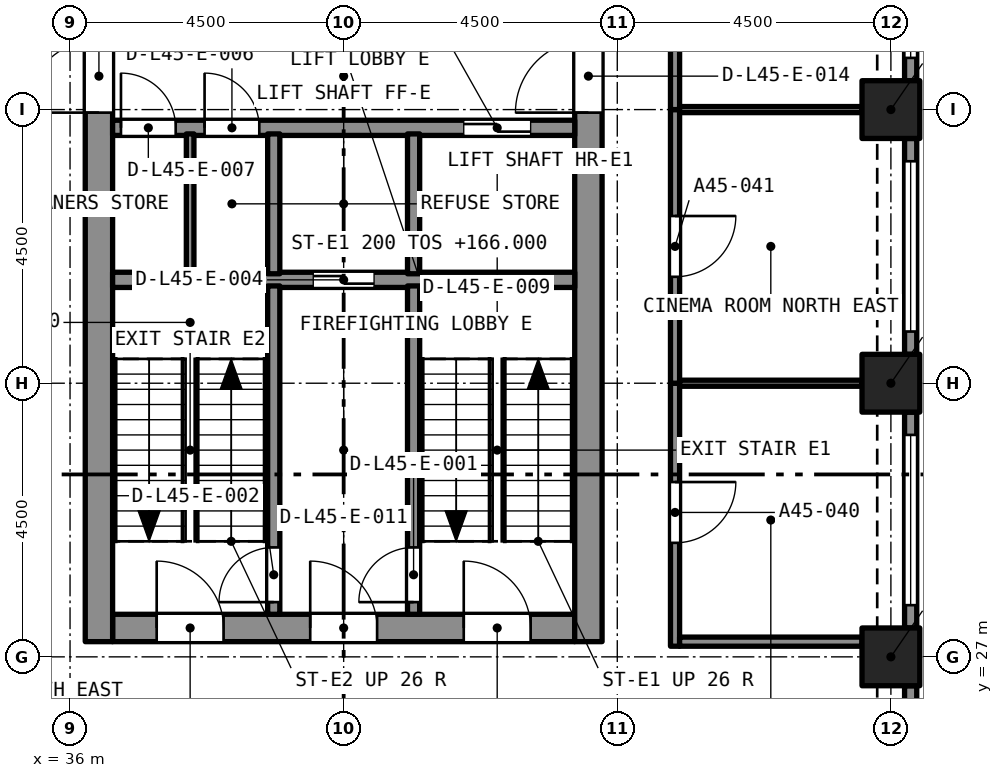
"""IFC4 building model, lengths in metres.
Left out: names, types, materials, properties, quantities, classifications, styles, units other than length and angle.
Written with IfcOpenShell. Run it as: python <this file> out.ifc"""

import sys

from ifc_helpers import new_model, si_unit, direction, frame, frame_2d, origin, origin_2d, place, context, subcontext, project, spatial, rectangle, extrude, element, fill, save


model = new_model("IFC4")
c1 = context("Model", 3, precision=1e-05, world=origin(), true_north=direction((0.0, 1.0)))
c2 = subcontext(c1, "Body", "Model", "MODEL_VIEW")
j1 = project(units=[si_unit("LENGTHUNIT", "METRE"), si_unit("PLANEANGLEUNIT", "RADIAN")], contexts=[c1])
p1 = place(None, origin())
s1 = spatial("IfcSite", under=j1, at=p1, CompositionType="ELEMENT")
p2 = place(p1, origin())
s2 = spatial("IfcBuilding", under=s1, at=p2, CompositionType="ELEMENT")
p3 = place(p2, frame((0.0, 0.0, 163.8)))
s3 = spatial("IfcBuildingStorey", under=s2, at=p3, CompositionType="ELEMENT", Elevation=163.8)
for number, where, z_axis, x_axis in (
    (1, (49.5, 27.0, 0.0), (0.0, 0.0, 1.0), (1.0, 0.0, 0.0)),
    (2, (49.5, 31.5, 0.0), (0.0, 0.0, 1.0), (1.0, 0.0, 0.0)),
    (3, (49.5, 36.0, 0.0), (0.0, 0.0, 1.0), (1.0, 0.0, 0.0)),
):
    element("IfcColumn", number, at=place(p3, frame(where, z_axis=z_axis, x_axis=x_axis)), inside=s3, PredefinedType="COLUMN", context=c2, shape_type="SweptSolid", body=[
        extrude(rectangle(XDim=0.95, YDim=0.95, at=origin_2d()), origin(), (0.0, 0.0, 1.0), 4.4),
    ])
p4 = place(p3, frame((36.7, 27.475, 0.0), z_axis=(0.0, 0.0, 1.0), x_axis=(1.0, 0.0, 0.0)))
e4 = element("IfcWall", 4, at=p4, inside=s3, PredefinedType="SOLIDWALL", context=c2, shape_type="SweptSolid", body=[
    extrude(rectangle(XDim=7.6, YDim=0.45, at=frame_2d((3.8, 0.0))), origin(), (0.0, 0.0, 1.0), 4.4),
])
p5 = place(p4, frame((5.775, 0.0, 0.0)))
e5 = element("IfcOpeningElement", 5, at=p5, cuts=e4, PredefinedType="OPENING", context=c2, shape_type="SweptSolid", body=[
    extrude(rectangle(XDim=1.1, YDim=2.1, at=frame_2d((0.55, 1.05))), frame((0.0, 0.235, 0.0), z_axis=(0.0, -1.0, 0.0), x_axis=(1.0, 0.0, 0.0)), (0.0, 0.0, 1.0), 0.47),
])
p6 = place(p4, frame((3.25, 0.0, 0.0)))
e6 = element("IfcOpeningElement", 6, at=p6, cuts=e4, PredefinedType="OPENING", context=c2, shape_type="SweptSolid", body=[
    extrude(rectangle(XDim=1.1, YDim=2.1, at=frame_2d((0.55, 1.05))), frame((0.0, 0.235, 0.0), z_axis=(0.0, -1.0, 0.0), x_axis=(1.0, 0.0, 0.0)), (0.0, 0.0, 1.0), 0.47),
])
p7 = place(p4, frame((0.725, 0.0, 0.0)))
e7 = element("IfcOpeningElement", 7, at=p7, cuts=e4, PredefinedType="OPENING", context=c2, shape_type="SweptSolid", body=[
    extrude(rectangle(XDim=1.1, YDim=2.1, at=frame_2d((0.55, 1.05))), frame((0.0, 0.235, 0.0), z_axis=(0.0, -1.0, 0.0), x_axis=(1.0, 0.0, 0.0)), (0.0, 0.0, 1.0), 0.47),
])
p8 = place(p3, frame((36.475, 27.25, 0.0), z_axis=(0.0, 0.0, 1.0), x_axis=(0.0, 1.0, 0.0)))
e8 = element("IfcWall", 8, at=p8, inside=s3, PredefinedType="SOLIDWALL", context=c2, shape_type="SweptSolid", body=[
    extrude(rectangle(XDim=13.0, YDim=0.45, at=frame_2d((6.5, 0.0))), origin(), (0.0, 0.0, 1.0), 4.4),
])
p9 = place(p8, frame((8.7, 0.0, 0.0)))
e9 = element("IfcOpeningElement", 9, at=p9, cuts=e8, PredefinedType="OPENING", context=c2, shape_type="SweptSolid", body=[
    extrude(rectangle(XDim=1.2, YDim=2.1, at=frame_2d((0.6, 1.05))), frame((0.0, 0.235, 0.0), z_axis=(0.0, -1.0, 0.0), x_axis=(1.0, 0.0, 0.0)), (0.0, 0.0, 1.0), 0.47),
])
p10 = place(p3, frame((44.525, 27.25, 0.0), z_axis=(0.0, 0.0, 1.0), x_axis=(0.0, 1.0, 0.0)))
e10 = element("IfcWall", 10, at=p10, inside=s3, PredefinedType="SOLIDWALL", context=c2, shape_type="SweptSolid", body=[
    extrude(rectangle(XDim=13.0, YDim=0.45, at=frame_2d((6.5, 0.0))), origin(), (0.0, 0.0, 1.0), 4.4),
])
p11 = place(p10, frame((8.7, 0.0, 0.0)))
e11 = element("IfcOpeningElement", 11, at=p11, cuts=e10, PredefinedType="OPENING", context=c2, shape_type="SweptSolid", body=[
    extrude(rectangle(XDim=1.2, YDim=2.1, at=frame_2d((0.6, 1.05))), frame((0.0, 0.235, 0.0), z_axis=(0.0, -1.0, 0.0), x_axis=(1.0, 0.0, 0.0)), (0.0, 0.0, 1.0), 0.47),
])
p12 = place(p3, frame((49.825, 26.525, 0.0), z_axis=(0.0, 0.0, 1.0), x_axis=(0.0, -1.0, 0.0)))
e12 = element("IfcWall", 12, at=p12, inside=s3, PredefinedType="SOLIDWALL", context=c2, shape_type="SweptSolid", body=[
    extrude(rectangle(XDim=3.55, YDim=0.2, at=frame_2d((1.775, 0.0))), origin(), (0.0, 0.0, 1.0), 4.4),
])
p13 = place(p12, frame((0.375, 0.0, 0.45)))
e13 = element("IfcOpeningElement", 13, at=p13, cuts=e12, PredefinedType="OPENING", context=c2, shape_type="SweptSolid", body=[
    extrude(rectangle(XDim=2.8, YDim=2.55, at=frame_2d((1.4, 1.275))), frame((0.0, 0.11, 0.0), z_axis=(0.0, -1.0, 0.0), x_axis=(1.0, 0.0, 0.0)), (0.0, 0.0, 1.0), 0.22),
])
p14 = place(p3, frame((49.825, 31.025, 0.0), z_axis=(0.0, 0.0, 1.0), x_axis=(0.0, -1.0, 0.0)))
e14 = element("IfcWall", 14, at=p14, inside=s3, PredefinedType="SOLIDWALL", context=c2, shape_type="SweptSolid", body=[
    extrude(rectangle(XDim=3.55, YDim=0.2, at=frame_2d((1.775, 0.0))), origin(), (0.0, 0.0, 1.0), 4.4),
])
p15 = place(p14, frame((0.375, 0.0, 0.45)))
e15 = element("IfcOpeningElement", 15, at=p15, cuts=e14, PredefinedType="OPENING", context=c2, shape_type="SweptSolid", body=[
    extrude(rectangle(XDim=2.8, YDim=2.55, at=frame_2d((1.4, 1.275))), frame((0.0, 0.11, 0.0), z_axis=(0.0, -1.0, 0.0), x_axis=(1.0, 0.0, 0.0)), (0.0, 0.0, 1.0), 0.22),
])
p16 = place(p3, frame((49.825, 35.525, 0.0), z_axis=(0.0, 0.0, 1.0), x_axis=(0.0, -1.0, 0.0)))
e16 = element("IfcWall", 16, at=p16, inside=s3, PredefinedType="SOLIDWALL", context=c2, shape_type="SweptSolid", body=[
    extrude(rectangle(XDim=3.55, YDim=0.2, at=frame_2d((1.775, 0.0))), origin(), (0.0, 0.0, 1.0), 4.4),
])
p17 = place(p16, frame((0.375, 0.0, 0.45)))
e17 = element("IfcOpeningElement", 17, at=p17, cuts=e16, PredefinedType="OPENING", context=c2, shape_type="SweptSolid", body=[
    extrude(rectangle(XDim=2.8, YDim=2.55, at=frame_2d((1.4, 1.275))), frame((0.0, 0.11, 0.0), z_axis=(0.0, -1.0, 0.0), x_axis=(1.0, 0.0, 0.0)), (0.0, 0.0, 1.0), 0.22),
])
p18 = place(p3, frame((49.825, 40.025, 0.0), z_axis=(0.0, 0.0, 1.0), x_axis=(0.0, -1.0, 0.0)))
e18 = element("IfcWall", 18, at=p18, inside=s3, PredefinedType="SOLIDWALL", context=c2, shape_type="SweptSolid", body=[
    extrude(rectangle(XDim=3.55, YDim=0.2, at=frame_2d((1.775, 0.0))), origin(), (0.0, 0.0, 1.0), 4.4),
])
p19 = place(p18, frame((0.375, 0.0, 0.45)))
e19 = element("IfcOpeningElement", 19, at=p19, cuts=e18, PredefinedType="OPENING", context=c2, shape_type="SweptSolid", body=[
    extrude(rectangle(XDim=2.8, YDim=2.55, at=frame_2d((1.4, 1.275))), frame((0.0, 0.11, 0.0), z_axis=(0.0, -1.0, 0.0), x_axis=(1.0, 0.0, 0.0)), (0.0, 0.0, 1.0), 0.22),
])
p20 = place(p3, frame((45.95, 31.5, 0.0), z_axis=(0.0, 0.0, 1.0), x_axis=(0.0, -1.0, 0.0)))
e20 = element("IfcWall", 20, at=p20, inside=s3, PredefinedType="PARTITIONING", context=c2, shape_type="SweptSolid", body=[
    extrude(rectangle(XDim=4.325, YDim=0.15, at=frame_2d((2.163, 0.0))), origin(), (0.0, 0.0, 1.0), 4.1),
])
p21 = place(p20, frame((1.625, 0.0, 0.0)))
e21 = element("IfcOpeningElement", 21, at=p21, cuts=e20, PredefinedType="OPENING", context=c2, shape_type="SweptSolid", body=[
    extrude(rectangle(XDim=1.0, YDim=2.1, at=frame_2d((0.5, 1.05))), frame((0.0, 0.085, 0.0), z_axis=(0.0, -1.0, 0.0), x_axis=(1.0, 0.0, 0.0)), (0.0, 0.0, 1.0), 0.17),
])
p22 = place(p3, frame((46.025, 27.25, 0.0), z_axis=(0.0, 0.0, 1.0), x_axis=(1.0, 0.0, 0.0)))
e22 = element("IfcWall", 22, at=p22, inside=s3, PredefinedType="PARTITIONING", context=c2, shape_type="SweptSolid", body=[
    extrude(rectangle(XDim=3.0, YDim=0.15, at=frame_2d((1.5, 0.0))), origin(), (0.0, 0.0, 1.0), 4.1),
])
p23 = place(p3, frame((45.95, 36.0, 0.0), z_axis=(0.0, 0.0, 1.0), x_axis=(0.0, -1.0, 0.0)))
e23 = element("IfcWall", 23, at=p23, inside=s3, PredefinedType="PARTITIONING", context=c2, shape_type="SweptSolid", body=[
    extrude(rectangle(XDim=4.5, YDim=0.15, at=frame_2d((2.25, 0.0))), origin(), (0.0, 0.0, 1.0), 4.1),
])
p24 = place(p23, frame((1.75, 0.0, 0.0)))
e24 = element("IfcOpeningElement", 24, at=p24, cuts=e23, PredefinedType="OPENING", context=c2, shape_type="SweptSolid", body=[
    extrude(rectangle(XDim=1.0, YDim=2.1, at=frame_2d((0.5, 1.05))), frame((0.0, 0.085, 0.0), z_axis=(0.0, -1.0, 0.0), x_axis=(1.0, 0.0, 0.0)), (0.0, 0.0, 1.0), 0.17),
])
p25 = place(p3, frame((45.95, 40.175, 0.0), z_axis=(0.0, 0.0, 1.0), x_axis=(0.0, -1.0, 0.0)))
e25 = element("IfcWall", 25, at=p25, inside=s3, PredefinedType="PARTITIONING", context=c2, shape_type="SweptSolid", body=[
    extrude(rectangle(XDim=4.175, YDim=0.15, at=frame_2d((2.087, 0.0))), origin(), (0.0, 0.0, 1.0), 4.1),
])
p26 = place(p25, frame((1.55, 0.0, 0.0)))
e26 = element("IfcOpeningElement", 26, at=p26, cuts=e25, PredefinedType="OPENING", context=c2, shape_type="SweptSolid", body=[
    extrude(rectangle(XDim=1.0, YDim=2.1, at=frame_2d((0.5, 1.05))), frame((0.0, 0.085, 0.0), z_axis=(0.0, -1.0, 0.0), x_axis=(1.0, 0.0, 0.0)), (0.0, 0.0, 1.0), 0.17),
])
for number, where, z_axis, x_axis in (
    (27, (46.025, 31.5, 0.0), (0.0, 0.0, 1.0), (1.0, 0.0, 0.0)),
    (28, (46.025, 36.0, 0.0), (0.0, 0.0, 1.0), (1.0, 0.0, 0.0)),
):
    element("IfcWall", number, at=place(p3, frame(where, z_axis=z_axis, x_axis=x_axis)), inside=s3, PredefinedType="PARTITIONING", context=c2, shape_type="SweptSolid", body=[
        extrude(rectangle(XDim=3.0, YDim=0.1, at=frame_2d((1.5, 0.0))), origin(), (0.0, 0.0, 1.0), 4.1),
    ])
p27 = place(p3, frame((36.7, 33.2, 0.0), z_axis=(0.0, 0.0, 1.0), x_axis=(1.0, 0.0, 0.0)))
e29 = element("IfcWall", 29, at=p27, inside=s3, PredefinedType="SOLIDWALL", context=c2, shape_type="SweptSolid", body=[
    extrude(rectangle(XDim=7.6, YDim=0.25, at=frame_2d((3.8, 0.0))), origin(), (0.0, 0.0, 1.0), 4.1),
])
p28 = place(p27, frame((3.3, 0.0, 0.0)))
e30 = element("IfcOpeningElement", 30, at=p28, cuts=e29, PredefinedType="OPENING", context=c2, shape_type="SweptSolid", body=[
    extrude(rectangle(XDim=1.0, YDim=2.1, at=frame_2d((0.5, 1.05))), frame((0.0, 0.135, 0.0), z_axis=(0.0, -1.0, 0.0), x_axis=(1.0, 0.0, 0.0)), (0.0, 0.0, 1.0), 0.27),
])
p29 = place(p3, frame((36.7, 35.7, 0.0), z_axis=(0.0, 0.0, 1.0), x_axis=(1.0, 0.0, 0.0)))
e31 = element("IfcWall", 31, at=p29, inside=s3, PredefinedType="SOLIDWALL", context=c2, shape_type="SweptSolid", body=[
    extrude(rectangle(XDim=7.6, YDim=0.25, at=frame_2d((3.8, 0.0))), origin(), (0.0, 0.0, 1.0), 4.1),
])
p30 = place(p29, frame((5.775, 0.0, 0.0)))
e32 = element("IfcOpeningElement", 32, at=p30, cuts=e31, PredefinedType="OPENING", context=c2, shape_type="SweptSolid", body=[
    extrude(rectangle(XDim=1.1, YDim=2.4, at=frame_2d((0.55, 1.2))), frame((0.0, 0.135, 0.0), z_axis=(0.0, -1.0, 0.0), x_axis=(1.0, 0.0, 0.0)), (0.0, 0.0, 1.0), 0.27),
])
p31 = place(p29, frame((1.512, 0.0, 0.0)))
e33 = element("IfcOpeningElement", 33, at=p31, cuts=e31, PredefinedType="OPENING", context=c2, shape_type="SweptSolid", body=[
    extrude(rectangle(XDim=0.9, YDim=2.1, at=frame_2d((0.45, 1.05))), frame((0.0, 0.135, 0.0), z_axis=(0.0, -1.0, 0.0), x_axis=(1.0, 0.0, 0.0)), (0.0, 0.0, 1.0), 0.27),
])
p32 = place(p29, frame((0.137, 0.0, 0.0)))
e34 = element("IfcOpeningElement", 34, at=p32, cuts=e31, PredefinedType="OPENING", context=c2, shape_type="SweptSolid", body=[
    extrude(rectangle(XDim=0.9, YDim=2.1, at=frame_2d((0.45, 1.05))), frame((0.0, 0.135, 0.0), z_axis=(0.0, -1.0, 0.0), x_axis=(1.0, 0.0, 0.0)), (0.0, 0.0, 1.0), 0.27),
])
p33 = place(p3, frame((41.65, 27.7, 0.0), z_axis=(0.0, 0.0, 1.0), x_axis=(0.0, 1.0, 0.0)))
e35 = element("IfcWall", 35, at=p33, inside=s3, PredefinedType="SOLIDWALL", context=c2, shape_type="SweptSolid", body=[
    extrude(rectangle(XDim=5.4, YDim=0.2, at=frame_2d((2.7, 0.0))), origin(), (0.0, 0.0, 1.0), 4.1),
])
p34 = place(p33, frame((0.2, 0.0, 0.0)))
e36 = element("IfcOpeningElement", 36, at=p34, cuts=e35, PredefinedType="OPENING", context=c2, shape_type="SweptSolid", body=[
    extrude(rectangle(XDim=0.9, YDim=2.1, at=frame_2d((0.45, 1.05))), frame((0.0, 0.11, 0.0), z_axis=(0.0, -1.0, 0.0), x_axis=(1.0, 0.0, 0.0)), (0.0, 0.0, 1.0), 0.22),
])
p35 = place(p3, frame((39.35, 27.7, 0.0), z_axis=(0.0, 0.0, 1.0), x_axis=(0.0, 1.0, 0.0)))
e37 = element("IfcWall", 37, at=p35, inside=s3, PredefinedType="SOLIDWALL", context=c2, shape_type="SweptSolid", body=[
    extrude(rectangle(XDim=5.4, YDim=0.2, at=frame_2d((2.7, 0.0))), origin(), (0.0, 0.0, 1.0), 4.1),
])
p36 = place(p35, frame((0.2, 0.0, 0.0)))
e38 = element("IfcOpeningElement", 38, at=p36, cuts=e37, PredefinedType="OPENING", context=c2, shape_type="SweptSolid", body=[
    extrude(rectangle(XDim=0.9, YDim=2.1, at=frame_2d((0.45, 1.05))), frame((0.0, 0.11, 0.0), z_axis=(0.0, -1.0, 0.0), x_axis=(1.0, 0.0, 0.0)), (0.0, 0.0, 1.0), 0.22),
])
for number, where, z_axis, x_axis in (
    (39, (41.65, 33.3, 0.0), (0.0, 0.0, 1.0), (0.0, 1.0, 0.0)),
    (40, (39.35, 33.3, 0.0), (0.0, 0.0, 1.0), (0.0, 1.0, 0.0)),
):
    element("IfcWall", number, at=place(p3, frame(where, z_axis=z_axis, x_axis=x_axis)), inside=s3, PredefinedType="SOLIDWALL", context=c2, shape_type="SweptSolid", body=[
        extrude(rectangle(XDim=2.3, YDim=0.2, at=frame_2d((1.15, 0.0))), origin(), (0.0, 0.0, 1.0), 4.1),
    ])
p37 = place(p3, frame((37.975, 33.3, 0.0), z_axis=(0.0, 0.0, 1.0), x_axis=(0.0, 1.0, 0.0)))
e41 = element("IfcWall", 41, at=p37, inside=s3, PredefinedType="PARTITIONING", context=c2, shape_type="SweptSolid", body=[
    extrude(rectangle(XDim=2.3, YDim=0.125, at=frame_2d((1.15, 0.0))), origin(), (0.0, 0.0, 1.0), 4.1),
])
p38 = place(p15, origin())
e42 = element("IfcWindow", 42, at=p38, inside=s3, PartitioningType="SINGLE_PANEL", PredefinedType="WINDOW", context=c2, shape_type="SweptSolid", body=[
    extrude(rectangle(XDim=2.8, YDim=2.55, at=frame_2d((1.4, 1.275))), frame((0.0, 0.03, 0.0), z_axis=(0.0, -1.0, 0.0), x_axis=(1.0, 0.0, 0.0)), (0.0, 0.0, 1.0), 0.06),
])
fill(e15, e42)
p39 = place(p17, origin())
e43 = element("IfcWindow", 43, at=p39, inside=s3, PartitioningType="SINGLE_PANEL", PredefinedType="WINDOW", context=c2, shape_type="SweptSolid", body=[
    extrude(rectangle(XDim=2.8, YDim=2.55, at=frame_2d((1.4, 1.275))), frame((0.0, 0.03, 0.0), z_axis=(0.0, -1.0, 0.0), x_axis=(1.0, 0.0, 0.0)), (0.0, 0.0, 1.0), 0.06),
])
fill(e17, e43)
p40 = place(p19, origin())
e44 = element("IfcWindow", 44, at=p40, inside=s3, PartitioningType="SINGLE_PANEL", PredefinedType="WINDOW", context=c2, shape_type="SweptSolid", body=[
    extrude(rectangle(XDim=2.8, YDim=2.55, at=frame_2d((1.4, 1.275))), frame((0.0, 0.03, 0.0), z_axis=(0.0, -1.0, 0.0), x_axis=(1.0, 0.0, 0.0)), (0.0, 0.0, 1.0), 0.06),
])
fill(e19, e44)
p41 = place(p21, origin())
e45 = element("IfcDoor", 45, at=p41, inside=s3, OperationType="SINGLE_SWING_LEFT", PredefinedType="DOOR", context=c2, shape_type="SweptSolid", body=[
    extrude(rectangle(XDim=1.0, YDim=2.1, at=frame_2d((0.5, 1.05))), frame((0.0, 0.025, 0.0), z_axis=(0.0, -1.0, 0.0), x_axis=(1.0, 0.0, 0.0)), (0.0, 0.0, 1.0), 0.05),
])
fill(e21, e45)
p42 = place(p24, origin())
e46 = element("IfcDoor", 46, at=p42, inside=s3, OperationType="SINGLE_SWING_RIGHT", PredefinedType="DOOR", context=c2, shape_type="SweptSolid", body=[
    extrude(rectangle(XDim=1.0, YDim=2.1, at=frame_2d((0.5, 1.05))), frame((0.0, 0.025, 0.0), z_axis=(0.0, -1.0, 0.0), x_axis=(1.0, 0.0, 0.0)), (0.0, 0.0, 1.0), 0.05),
])
fill(e24, e46)
p43 = place(p34, origin())
e47 = element("IfcDoor", 47, at=p43, inside=s3, OperationType="SINGLE_SWING_LEFT", PredefinedType="DOOR", context=c2, shape_type="SweptSolid", body=[
    extrude(rectangle(XDim=0.9, YDim=2.1, at=frame_2d((0.45, 1.05))), frame((0.0, 0.025, 0.0), z_axis=(0.0, -1.0, 0.0), x_axis=(1.0, 0.0, 0.0)), (0.0, 0.0, 1.0), 0.05),
])
fill(e36, e47)
p44 = place(p36, origin())
e48 = element("IfcDoor", 48, at=p44, inside=s3, OperationType="SINGLE_SWING_LEFT", PredefinedType="DOOR", context=c2, shape_type="SweptSolid", body=[
    extrude(rectangle(XDim=0.9, YDim=2.1, at=frame_2d((0.45, 1.05))), frame((0.0, 0.025, 0.0), z_axis=(0.0, -1.0, 0.0), x_axis=(1.0, 0.0, 0.0)), (0.0, 0.0, 1.0), 0.05),
])
fill(e38, e48)
p45 = place(p30, origin())
e49 = element("IfcDoor", 49, at=p45, inside=s3, OperationType="SLIDING_TO_LEFT", PredefinedType="DOOR", context=c2, shape_type="SweptSolid", body=[
    extrude(rectangle(XDim=1.1, YDim=2.4, at=frame_2d((0.55, 1.2))), frame((0.0, 0.025, 0.0), z_axis=(0.0, -1.0, 0.0), x_axis=(1.0, 0.0, 0.0)), (0.0, 0.0, 1.0), 0.05),
])
fill(e32, e49)
p46 = place(p28, origin())
e50 = element("IfcDoor", 50, at=p46, inside=s3, OperationType="SLIDING_TO_LEFT", PredefinedType="DOOR", context=c2, shape_type="SweptSolid", body=[
    extrude(rectangle(XDim=1.0, YDim=2.1, at=frame_2d((0.5, 1.05))), frame((0.0, 0.025, 0.0), z_axis=(0.0, -1.0, 0.0), x_axis=(1.0, 0.0, 0.0)), (0.0, 0.0, 1.0), 0.05),
])
fill(e30, e50)
p47 = place(p31, origin())
e51 = element("IfcDoor", 51, at=p47, inside=s3, OperationType="SINGLE_SWING_LEFT", PredefinedType="DOOR", context=c2, shape_type="SweptSolid", body=[
    extrude(rectangle(XDim=0.9, YDim=2.1, at=frame_2d((0.45, 1.05))), frame((0.0, 0.025, 0.0), z_axis=(0.0, -1.0, 0.0), x_axis=(1.0, 0.0, 0.0)), (0.0, 0.0, 1.0), 0.05),
])
fill(e33, e51)
p48 = place(p32, origin())
e52 = element("IfcDoor", 52, at=p48, inside=s3, OperationType="SINGLE_SWING_LEFT", PredefinedType="DOOR", context=c2, shape_type="SweptSolid", body=[
    extrude(rectangle(XDim=0.9, YDim=2.1, at=frame_2d((0.45, 1.05))), frame((0.0, 0.025, 0.0), z_axis=(0.0, -1.0, 0.0), x_axis=(1.0, 0.0, 0.0)), (0.0, 0.0, 1.0), 0.05),
])
fill(e34, e52)
p49 = place(p5, origin())
e53 = element("IfcDoor", 53, at=p49, inside=s3, OperationType="SINGLE_SWING_LEFT", PredefinedType="DOOR", context=c2, shape_type="SweptSolid", body=[
    extrude(rectangle(XDim=1.1, YDim=2.1, at=frame_2d((0.55, 1.05))), frame((0.0, 0.025, 0.0), z_axis=(0.0, -1.0, 0.0), x_axis=(1.0, 0.0, 0.0)), (0.0, 0.0, 1.0), 0.05),
])
fill(e5, e53)
p50 = place(p6, origin())
e54 = element("IfcDoor", 54, at=p50, inside=s3, OperationType="SINGLE_SWING_LEFT", PredefinedType="DOOR", context=c2, shape_type="SweptSolid", body=[
    extrude(rectangle(XDim=1.1, YDim=2.1, at=frame_2d((0.55, 1.05))), frame((0.0, 0.025, 0.0), z_axis=(0.0, -1.0, 0.0), x_axis=(1.0, 0.0, 0.0)), (0.0, 0.0, 1.0), 0.05),
])
fill(e6, e54)
p51 = place(p7, origin())
e55 = element("IfcDoor", 55, at=p51, inside=s3, OperationType="SINGLE_SWING_LEFT", PredefinedType="DOOR", context=c2, shape_type="SweptSolid", body=[
    extrude(rectangle(XDim=1.1, YDim=2.1, at=frame_2d((0.55, 1.05))), frame((0.0, 0.025, 0.0), z_axis=(0.0, -1.0, 0.0), x_axis=(1.0, 0.0, 0.0)), (0.0, 0.0, 1.0), 0.05),
])
fill(e7, e55)
p52 = place(p9, origin())
e56 = element("IfcDoor", 56, at=p52, inside=s3, OperationType="SINGLE_SWING_LEFT", PredefinedType="DOOR", context=c2, shape_type="SweptSolid", body=[
    extrude(rectangle(XDim=1.2, YDim=2.1, at=frame_2d((0.6, 1.05))), frame((0.0, 0.025, 0.0), z_axis=(0.0, -1.0, 0.0), x_axis=(1.0, 0.0, 0.0)), (0.0, 0.0, 1.0), 0.05),
])
fill(e9, e56)
p53 = place(p11, origin())
e57 = element("IfcDoor", 57, at=p53, inside=s3, OperationType="SINGLE_SWING_LEFT", PredefinedType="DOOR", context=c2, shape_type="SweptSolid", body=[
    extrude(rectangle(XDim=1.2, YDim=2.1, at=frame_2d((0.6, 1.05))), frame((0.0, 0.025, 0.0), z_axis=(0.0, -1.0, 0.0), x_axis=(1.0, 0.0, 0.0)), (0.0, 0.0, 1.0), 0.05),
])
fill(e11, e57)
save(model, sys.argv[1])
